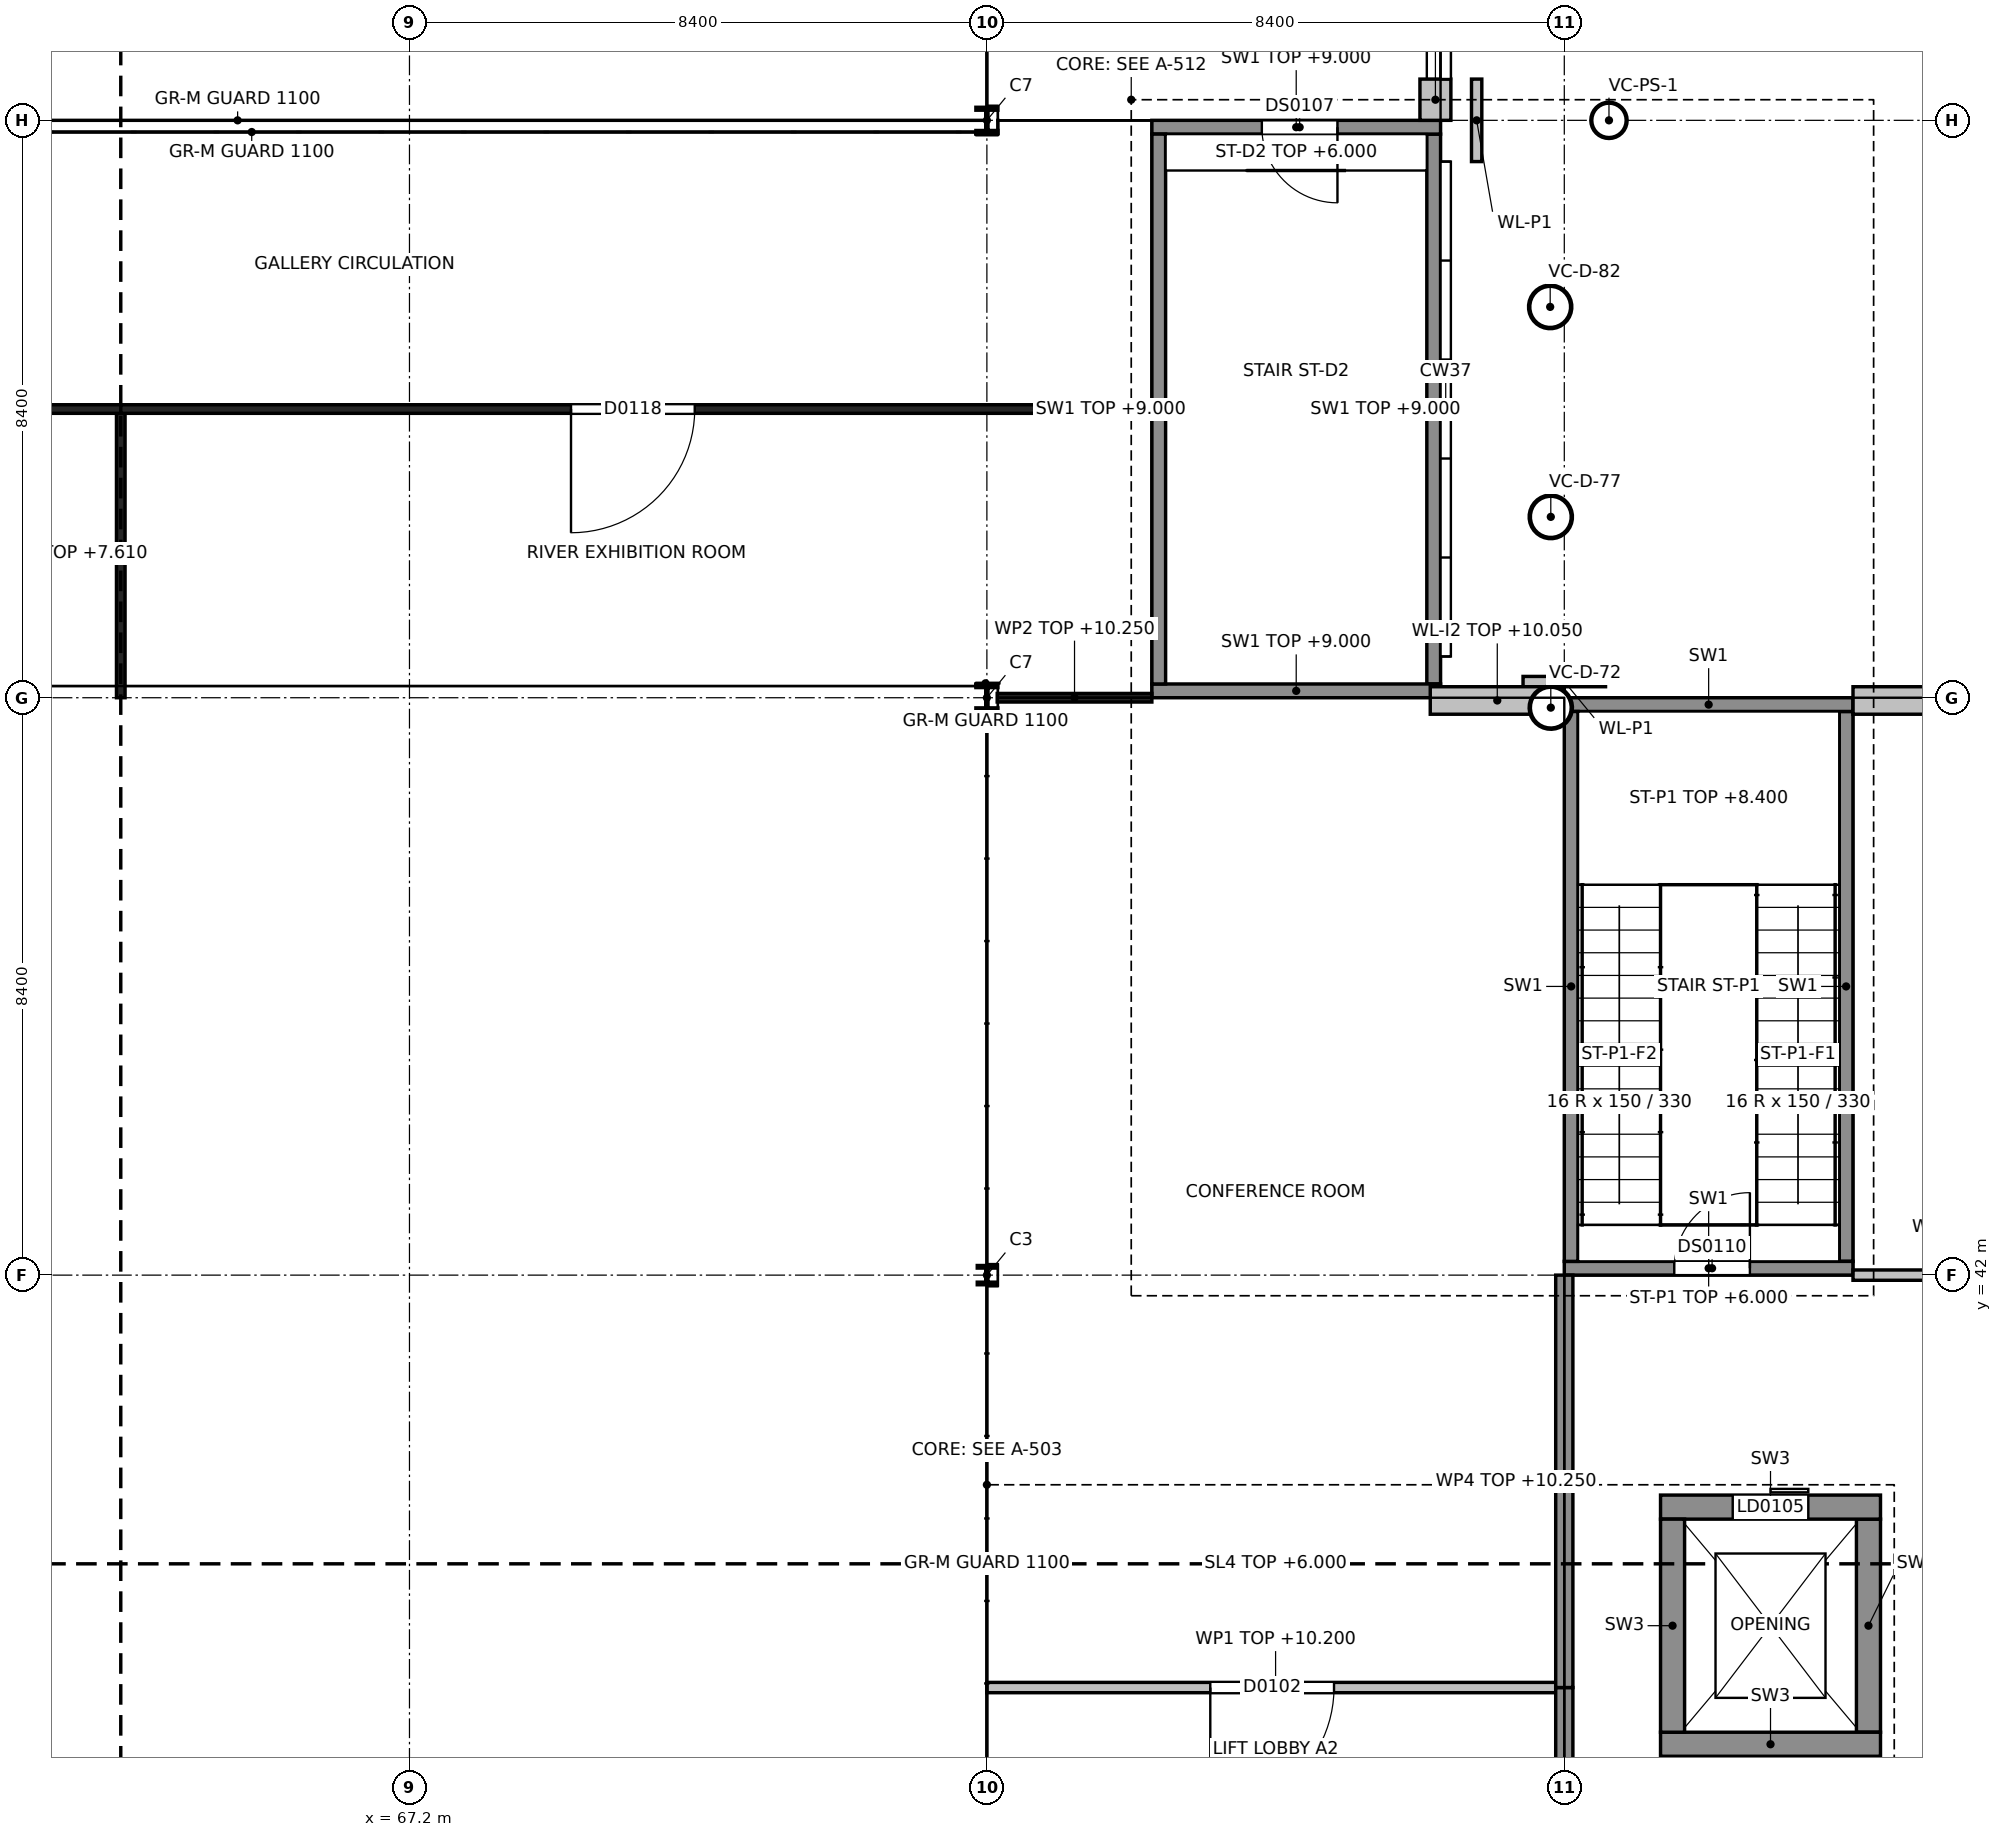
"""IFC4 building model, lengths in metres.
Left out: names, types, materials, properties, quantities, classifications, styles, units other than length and angle.
Written with IfcOpenShell. Run it as: python <this file> out.ifc"""

import sys

from ifc_helpers import new_model, si_unit, direction, frame, frame_2d, origin, origin_2d, place, context, subcontext, project, spatial, rectangle, hollow_circle, i_section, extrude, element, fill, save


model = new_model("IFC4")
c1 = context("Model", 3, precision=1e-05, world=origin(), true_north=direction((0.0, 1.0)))
c2 = subcontext(c1, "Body", "Model", "MODEL_VIEW")
j1 = project(units=[si_unit("LENGTHUNIT", "METRE"), si_unit("PLANEANGLEUNIT", "RADIAN")], contexts=[c1])
p1 = place(None, origin())
s1 = spatial("IfcSite", under=j1, at=p1, CompositionType="ELEMENT")
p2 = place(p1, origin())
s2 = spatial("IfcBuilding", under=s1, at=p2, CompositionType="ELEMENT")
p3 = place(p2, frame((0.0, 0.0, 6.0)))
s3 = spatial("IfcBuildingStorey", under=s2, at=p3, CompositionType="ELEMENT", Elevation=6.0)
p4 = place(p3, frame((83.789, 50.276, 0.0), z_axis=(0.012102581287, -0.016831741202, 0.999785086913), x_axis=(0.811906374981, 0.583787665394, 0.0)))
e1 = element("IfcColumn", 1, at=p4, inside=s3, PredefinedType="COLUMN", context=c2, shape_type="SweptSolid", body=[
    extrude(hollow_circle(Radius=0.305, WallThickness=0.02, at=origin_2d()), origin(), (0.0, 0.0, 1.0), 4.801),
])
p5 = place(p3, frame((83.789, 53.195, 0.0), z_axis=(0.011992830994, -0.135398054119, 0.990718698191), x_axis=(0.996100200333, 0.088229195266, 0.0)))
e2 = element("IfcColumn", 2, at=p5, inside=s3, PredefinedType="COLUMN", context=c2, shape_type="SweptSolid", body=[
    extrude(hollow_circle(Radius=0.305, WallThickness=0.02, at=origin_2d()), origin(), (0.0, 0.0, 1.0), 4.845),
])
p6 = place(p3, frame((83.781, 55.934, 0.0), z_axis=(0.010998920165, 0.125983044275, 0.9919714191), x_axis=(-0.996210587756, 0.086973931971, 0.0)))
e3 = element("IfcColumn", 3, at=p6, inside=s3, PredefinedType="COLUMN", context=c2, shape_type="SweptSolid", body=[
    extrude(hollow_circle(Radius=0.305, WallThickness=0.02, at=origin_2d()), origin(), (0.0, 0.0, 1.0), 4.839),
])
p7 = place(p2, origin())
s4 = spatial("IfcBuildingStorey", under=s2, at=p7, CompositionType="ELEMENT", Elevation=0.0)
p8 = place(p7, frame((84.65, 58.8, -1.35), z_axis=(0.0, 0.0, 1.0), x_axis=(1.0, 0.0, 0.0)))
e4 = element("IfcColumn", 4, at=p8, inside=s4, PredefinedType="COLUMN", context=c2, shape_type="SweptSolid", body=[
    extrude(hollow_circle(Radius=0.254, WallThickness=0.016, at=origin_2d()), origin(), (0.0, 0.0, 1.0), 9.989),
])
p9 = place(p3, frame((75.6, 42.0, 0.0), z_axis=(0.0, 0.0, 1.0), x_axis=(1.0, 0.0, 0.0)))
e5 = element("IfcColumn", 5, at=p9, inside=s3, PredefinedType="COLUMN", context=c2, shape_type="SweptSolid", body=[
    extrude(i_section(OverallWidth=0.26, OverallDepth=0.26, WebThickness=0.01, FlangeThickness=0.018, at=origin_2d()), origin(), (0.0, 0.0, 1.0), 4.8),
])
for number, where, z_axis, x_axis in (
    (6, (75.6, 50.4, 0.0), (0.0, 0.0, 1.0), (1.0, 0.0, 0.0)),
    (7, (75.6, 58.8, 0.0), (0.0, 0.0, 1.0), (1.0, 0.0, 0.0)),
):
    element("IfcColumn", number, at=place(p3, frame(where, z_axis=z_axis, x_axis=x_axis)), inside=s3, PredefinedType="COLUMN", context=c2, shape_type="SweptSolid", body=[
        extrude(i_section(OverallWidth=0.3, OverallDepth=0.36, WebThickness=0.012, FlangeThickness=0.022, at=origin_2d()), origin(), (0.0, 0.0, 1.0), 4.8),
    ])
p10 = place(p3, frame((78.0, 50.5, 0.0), z_axis=(0.0, 0.0, 1.0), x_axis=(1.0, 0.0, 0.0)))
e8 = element("IfcWall", 8, at=p10, inside=s3, PredefinedType="SHEAR", context=c2, shape_type="SweptSolid", body=[
    extrude(rectangle(XDim=4.2, YDim=0.2, at=frame_2d((2.1, 0.0))), origin(), (0.0, 0.0, 1.0), 3.0),
])
p11 = place(p3, frame((78.0, 58.7, 0.0), z_axis=(0.0, 0.0, 1.0), x_axis=(1.0, 0.0, 0.0)))
e9 = element("IfcWall", 9, at=p11, inside=s3, PredefinedType="SHEAR", context=c2, shape_type="SweptSolid", body=[
    extrude(rectangle(XDim=4.2, YDim=0.2, at=frame_2d((2.1, 0.0))), origin(), (0.0, 0.0, 1.0), 3.0),
])
p12 = place(p11, frame((1.6, 0.0, 0.0)))
e10 = element("IfcOpeningElement", 10, at=p12, cuts=e9, PredefinedType="OPENING", context=c2, shape_type="SweptSolid", body=[
    extrude(rectangle(XDim=1.1, YDim=2.1, at=frame_2d((0.55, 1.05))), frame((0.0, 0.1, 0.0), z_axis=(0.0, -1.0, 0.0), x_axis=(1.0, 0.0, 0.0)), (0.0, 0.0, 1.0), 0.2),
])
for number, where, z_axis, x_axis in (
    (11, (78.1, 50.6, 0.0), (0.0, 0.0, 1.0), (0.0, 1.0, 0.0)),
    (12, (82.1, 50.6, 0.0), (0.0, 0.0, 1.0), (0.0, 1.0, 0.0)),
):
    element("IfcWall", number, at=place(p3, frame(where, z_axis=z_axis, x_axis=x_axis)), inside=s3, PredefinedType="SHEAR", context=c2, shape_type="SweptSolid", body=[
        extrude(rectangle(XDim=8.0, YDim=0.2, at=frame_2d((4.0, 0.0))), origin(), (0.0, 0.0, 1.0), 3.0),
    ])
p13 = place(p3, frame((84.0, 42.1, 0.0), z_axis=(0.0, 0.0, 1.0), x_axis=(1.0, 0.0, 0.0)))
e13 = element("IfcWall", 13, at=p13, inside=s3, PredefinedType="SHEAR", context=c2, shape_type="SweptSolid", body=[
    extrude(rectangle(XDim=4.2, YDim=0.2, at=frame_2d((2.1, 0.0))), origin(), (0.0, 0.0, 1.0), 4.8),
])
p14 = place(p13, frame((1.6, 0.0, 0.0)))
e14 = element("IfcOpeningElement", 14, at=p14, cuts=e13, PredefinedType="OPENING", context=c2, shape_type="SweptSolid", body=[
    extrude(rectangle(XDim=1.1, YDim=2.1, at=frame_2d((0.55, 1.05))), frame((0.0, 0.1, 0.0), z_axis=(0.0, -1.0, 0.0), x_axis=(1.0, 0.0, 0.0)), (0.0, 0.0, 1.0), 0.2),
])
p15 = place(p3, frame((84.0, 50.3, 0.0), z_axis=(0.0, 0.0, 1.0), x_axis=(1.0, 0.0, 0.0)))
e15 = element("IfcWall", 15, at=p15, inside=s3, PredefinedType="SHEAR", context=c2, shape_type="SweptSolid", body=[
    extrude(rectangle(XDim=4.2, YDim=0.2, at=frame_2d((2.1, 0.0))), origin(), (0.0, 0.0, 1.0), 4.8),
])
for number, where, z_axis, x_axis in (
    (16, (84.1, 42.2, 0.0), (0.0, 0.0, 1.0), (0.0, 1.0, 0.0)),
    (17, (88.1, 42.2, 0.0), (0.0, 0.0, 1.0), (0.0, 1.0, 0.0)),
):
    element("IfcWall", number, at=place(p3, frame(where, z_axis=z_axis, x_axis=x_axis)), inside=s3, PredefinedType="SHEAR", context=c2, shape_type="SweptSolid", body=[
        extrude(rectangle(XDim=8.0, YDim=0.2, at=frame_2d((4.0, 0.0))), origin(), (0.0, 0.0, 1.0), 4.8),
    ])
p16 = place(p3, frame((85.4, 35.175, 0.0), z_axis=(0.0, 0.0, 1.0), x_axis=(1.0, 0.0, 0.0)))
e18 = element("IfcWall", 18, at=p16, inside=s3, PredefinedType="SHEAR", context=c2, shape_type="SweptSolid", body=[
    extrude(rectangle(XDim=3.2, YDim=0.35, at=frame_2d((1.6, 0.0))), origin(), (0.0, 0.0, 1.0), 4.8),
])
p17 = place(p3, frame((85.4, 38.625, 0.0), z_axis=(0.0, 0.0, 1.0), x_axis=(1.0, 0.0, 0.0)))
e19 = element("IfcWall", 19, at=p17, inside=s3, PredefinedType="SHEAR", context=c2, shape_type="SweptSolid", body=[
    extrude(rectangle(XDim=3.2, YDim=0.35, at=frame_2d((1.6, 0.0))), origin(), (0.0, 0.0, 1.0), 4.8),
])
p18 = place(p17, frame((1.05, 0.0, 0.0)))
e20 = element("IfcOpeningElement", 20, at=p18, cuts=e19, PredefinedType="OPENING", context=c2, shape_type="SweptSolid", body=[
    extrude(rectangle(XDim=1.1, YDim=2.1, at=frame_2d((0.55, 1.05))), frame((0.0, 0.175, 0.0), z_axis=(0.0, -1.0, 0.0), x_axis=(1.0, 0.0, 0.0)), (0.0, 0.0, 1.0), 0.35),
])
for number, where, z_axis, x_axis in (
    (21, (85.575, 35.35, 0.0), (0.0, 0.0, 1.0), (0.0, 1.0, 0.0)),
    (22, (88.425, 35.35, 0.0), (0.0, 0.0, 1.0), (0.0, 1.0, 0.0)),
):
    element("IfcWall", number, at=place(p3, frame(where, z_axis=z_axis, x_axis=x_axis)), inside=s3, PredefinedType="SHEAR", context=c2, shape_type="SweptSolid", body=[
        extrude(rectangle(XDim=3.1, YDim=0.35, at=frame_2d((1.55, 0.0))), origin(), (0.0, 0.0, 1.0), 4.8),
    ])
p19 = place(p3, frame((82.05, 50.36, 0.0), z_axis=(0.0, 0.0, 1.0), x_axis=(1.0, 0.0, 0.0)))
e23 = element("IfcWall", 23, at=p19, inside=s3, PredefinedType="SOLIDWALL", context=c2, shape_type="SweptSolid", body=[
    extrude(rectangle(XDim=1.95, YDim=0.4, at=frame_2d((0.975, 0.0))), origin(), (0.0, 0.0, 1.0), 4.05),
])
p20 = place(p3, frame((88.2, 50.36, 0.0), z_axis=(0.0, 0.0, 1.0), x_axis=(1.0, 0.0, 0.0)))
e24 = element("IfcWall", 24, at=p20, inside=s3, PredefinedType="SOLIDWALL", context=c2, shape_type="SweptSolid", body=[
    extrude(rectangle(XDim=4.05, YDim=0.4, at=frame_2d((2.025, 0.0))), origin(), (0.0, 0.0, 1.0), 4.05),
])
p21 = place(p3, frame((83.4, 50.635, 0.0), z_axis=(0.0, 0.0, 1.0), x_axis=(1.0, 0.0, 0.0)))
e25 = element("IfcWall", 25, at=p21, inside=s3, PredefinedType="SOLIDWALL", context=c2, shape_type="SweptSolid", body=[
    extrude(rectangle(XDim=1.2, YDim=0.15, at=frame_2d((0.6, 0.0))), origin(), (0.0, 0.0, 1.0), 4.8),
])
p22 = place(p3, frame((82.175, 59.4, 0.0), z_axis=(0.0, 0.0, 1.0), x_axis=(0.0, 1.0, 0.0)))
e26 = element("IfcWall", 26, at=p22, inside=s3, PredefinedType="SOLIDWALL", context=c2, shape_type="SweptSolid", body=[
    extrude(rectangle(XDim=7.2, YDim=0.35, at=frame_2d((3.6, 0.0))), origin(), (0.0, 0.0, 1.0), 0.9),
])
p23 = place(p3, frame((82.125, 58.8, 0.0), z_axis=(0.0, 0.0, 1.0), x_axis=(0.0, 1.0, 0.0)))
e27 = element("IfcWall", 27, at=p23, inside=s3, PredefinedType="SOLIDWALL", context=c2, shape_type="SweptSolid", body=[
    extrude(rectangle(XDim=0.6, YDim=0.45, at=frame_2d((0.3, 0.0))), origin(), (0.0, 0.0, 1.0), 19.4),
])
p24 = place(p3, frame((82.725, 58.2, 0.0), z_axis=(0.0, 0.0, 1.0), x_axis=(0.0, 1.0, 0.0)))
e28 = element("IfcWall", 28, at=p24, inside=s3, PredefinedType="SOLIDWALL", context=c2, shape_type="SweptSolid", body=[
    extrude(rectangle(XDim=1.2, YDim=0.15, at=frame_2d((0.6, 0.0))), origin(), (0.0, 0.0, 1.0), 4.8),
])
p25 = place(p3, frame((75.6, 36.0, 0.0), z_axis=(0.0, 0.0, 1.0), x_axis=(1.0, 0.0, 0.0)))
e29 = element("IfcWall", 29, at=p25, inside=s3, PredefinedType="PARTITIONING", context=c2, shape_type="SweptSolid", body=[
    extrude(rectangle(XDim=8.4, YDim=0.15, at=frame_2d((4.2, 0.0))), origin(), (0.0, 0.0, 1.0), 4.2),
])
p26 = place(p25, frame((3.25, 0.0, 0.0)))
e30 = element("IfcOpeningElement", 30, at=p26, cuts=e29, PredefinedType="OPENING", context=c2, shape_type="SweptSolid", body=[
    extrude(rectangle(XDim=1.8, YDim=2.1, at=frame_2d((0.9, 1.05))), frame((0.0, 0.075, 0.0), z_axis=(0.0, -1.0, 0.0), x_axis=(1.0, 0.0, 0.0)), (0.0, 0.0, 1.0), 0.15),
])
p27 = place(p3, frame((84.0, 33.6, 0.0), z_axis=(0.0, 0.0, 1.0), x_axis=(0.0, 1.0, 0.0)))
e31 = element("IfcWall", 31, at=p27, inside=s3, PredefinedType="PARTITIONING", context=c2, shape_type="SweptSolid", body=[
    extrude(rectangle(XDim=2.4, YDim=0.25, at=frame_2d((1.2, 0.0))), origin(), (0.0, 0.0, 1.0), 4.26),
])
p28 = place(p3, frame((84.0, 36.0, 0.0), z_axis=(0.0, 0.0, 1.0), x_axis=(0.0, 1.0, 0.0)))
e32 = element("IfcWall", 32, at=p28, inside=s3, PredefinedType="PARTITIONING", context=c2, shape_type="SweptSolid", body=[
    extrude(rectangle(XDim=6.0, YDim=0.25, at=frame_2d((3.0, 0.0))), origin(), (0.0, 0.0, 1.0), 4.25),
])
p29 = place(p3, frame((75.75, 50.4, 0.0), z_axis=(0.0, 0.0, 1.0), x_axis=(1.0, 0.0, 0.0)))
e33 = element("IfcWall", 33, at=p29, inside=s3, PredefinedType="PARTITIONING", context=c2, shape_type="SweptSolid", body=[
    extrude(rectangle(XDim=2.25, YDim=0.125, at=frame_2d((1.125, 0.0))), origin(), (0.0, 0.0, 1.0), 4.25),
])
p30 = place(p3, frame((88.2, 42.0, 0.0), z_axis=(0.0, 0.0, 1.0), x_axis=(1.0, 0.0, 0.0)))
e34 = element("IfcWall", 34, at=p30, inside=s3, PredefinedType="PARTITIONING", context=c2, shape_type="SweptSolid", body=[
    extrude(rectangle(XDim=4.05, YDim=0.15, at=frame_2d((2.025, 0.0))), origin(), (0.0, 0.0, 1.0), 4.67),
])
p31 = place(p3, frame((63.0, 50.4, 0.0), z_axis=(0.0, 0.0, 1.0), x_axis=(0.0, 1.0, 0.0)))
e35 = element("IfcWall", 35, at=p31, inside=s3, PredefinedType="PARTITIONING", context=c2, shape_type="SweptSolid", body=[
    extrude(rectangle(XDim=4.2, YDim=0.125, at=frame_2d((2.1, 0.0))), origin(), (0.0, 0.0, 1.0), 1.61),
])
p32 = place(p3, frame((48.0, 54.6, 0.0), z_axis=(0.0, 0.0, 1.0), x_axis=(1.0, 0.0, 0.0)))
e36 = element("IfcWall", 36, at=p32, inside=s3, PredefinedType="PARTITIONING", context=c2, shape_type="SweptSolid", body=[
    extrude(rectangle(XDim=15.0, YDim=0.125, at=frame_2d((7.5, 0.0))), origin(), (0.0, 0.0, 1.0), 4.67),
])
p33 = place(p32, frame((6.55, 0.0, 0.0)))
e37 = element("IfcOpeningElement", 37, at=p33, cuts=e36, PredefinedType="OPENING", context=c2, shape_type="SweptSolid", body=[
    extrude(rectangle(XDim=1.8, YDim=2.1, at=frame_2d((0.9, 1.05))), frame((0.0, 0.062, 0.0), z_axis=(0.0, -1.0, 0.0), x_axis=(1.0, 0.0, 0.0)), (0.0, 0.0, 1.0), 0.125),
])
p34 = place(p3, frame((63.0, 54.6, 0.0), z_axis=(0.0, 0.0, 1.0), x_axis=(1.0, 0.0, 0.0)))
e38 = element("IfcWall", 38, at=p34, inside=s3, PredefinedType="PARTITIONING", context=c2, shape_type="SweptSolid", body=[
    extrude(rectangle(XDim=15.0, YDim=0.125, at=frame_2d((7.5, 0.0))), origin(), (0.0, 0.0, 1.0), 4.67),
])
p35 = place(p34, frame((6.55, 0.0, 0.0)))
e39 = element("IfcOpeningElement", 39, at=p35, cuts=e38, PredefinedType="OPENING", context=c2, shape_type="SweptSolid", body=[
    extrude(rectangle(XDim=1.8, YDim=2.1, at=frame_2d((0.9, 1.05))), frame((0.0, 0.062, 0.0), z_axis=(0.0, -1.0, 0.0), x_axis=(1.0, 0.0, 0.0)), (0.0, 0.0, 1.0), 0.125),
])
p36 = place(p26, origin())
e40 = element("IfcDoor", 40, at=p36, inside=s3, OperationType="DOUBLE_DOOR_DOUBLE_SWING", PredefinedType="DOOR", context=c2, shape_type="SweptSolid", body=[
    extrude(rectangle(XDim=1.8, YDim=2.1, at=frame_2d((0.9, 1.05))), frame((0.0, 0.025, 0.0), z_axis=(0.0, -1.0, 0.0), x_axis=(1.0, 0.0, 0.0)), (0.0, 0.0, 1.0), 0.05),
])
fill(e30, e40)
p37 = place(p35, origin())
e41 = element("IfcDoor", 41, at=p37, inside=s3, OperationType="DOUBLE_DOOR_DOUBLE_SWING", PredefinedType="DOOR", context=c2, shape_type="SweptSolid", body=[
    extrude(rectangle(XDim=1.8, YDim=2.1, at=frame_2d((0.9, 1.05))), frame((0.0, 0.025, 0.0), z_axis=(0.0, -1.0, 0.0), x_axis=(1.0, 0.0, 0.0)), (0.0, 0.0, 1.0), 0.05),
])
fill(e39, e41)
p38 = place(p12, origin())
e42 = element("IfcDoor", 42, at=p38, inside=s3, OperationType="SINGLE_SWING_RIGHT", PredefinedType="DOOR", context=c2, shape_type="SweptSolid", body=[
    extrude(rectangle(XDim=1.1, YDim=2.1, at=frame_2d((0.55, 1.05))), frame((0.0, 0.025, 0.0), z_axis=(0.0, -1.0, 0.0), x_axis=(1.0, 0.0, 0.0)), (0.0, 0.0, 1.0), 0.05),
])
fill(e10, e42)
p39 = place(p14, origin())
e43 = element("IfcDoor", 43, at=p39, inside=s3, OperationType="SINGLE_SWING_RIGHT", PredefinedType="DOOR", context=c2, shape_type="SweptSolid", body=[
    extrude(rectangle(XDim=1.1, YDim=2.1, at=frame_2d((0.55, 1.05))), frame((0.0, 0.025, 0.0), z_axis=(0.0, -1.0, 0.0), x_axis=(1.0, 0.0, 0.0)), (0.0, 0.0, 1.0), 0.05),
])
fill(e14, e43)
p40 = place(p18, origin())
e44 = element("IfcDoor", 44, at=p40, inside=s3, OperationType="SLIDING_TO_LEFT", PredefinedType="DOOR", context=c2, shape_type="SweptSolid", body=[
    extrude(rectangle(XDim=1.1, YDim=2.1, at=frame_2d((0.55, 1.05))), frame((0.0, 0.025, 0.0), z_axis=(0.0, -1.0, 0.0), x_axis=(1.0, 0.0, 0.0)), (0.0, 0.0, 1.0), 0.05),
])
fill(e20, e44)
save(model, sys.argv[1])
